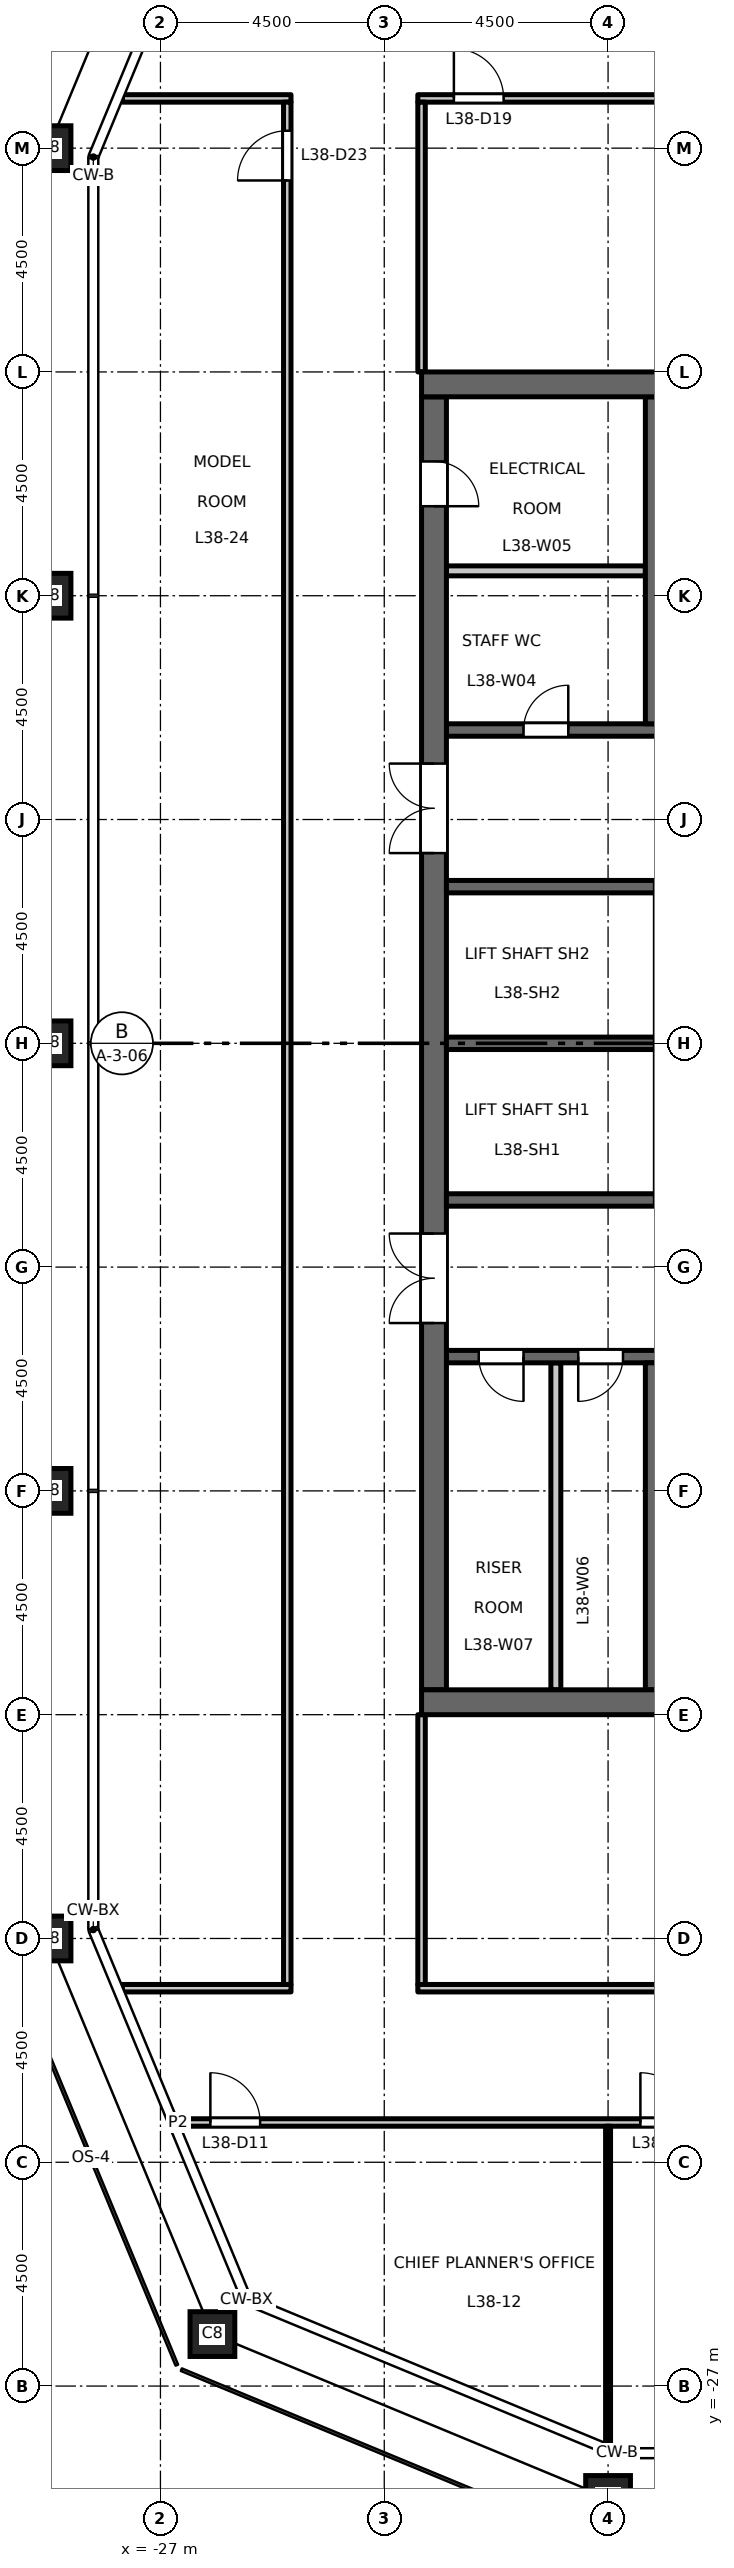
"""IFC4 building model, lengths in metres.
Left out: names, types, materials, properties, quantities, classifications, styles, units other than length and angle.
Written with IfcOpenShell. Run it as: python <this file> out.ifc"""

import sys

from ifc_helpers import new_model, si_unit, direction, frame, frame_2d, origin, origin_2d, place, context, subcontext, project, spatial, rectangle, hollow_rectangle, extrude, element, fill, save


model = new_model("IFC4")
c1 = context("Model", 3, precision=1e-05, world=origin(), true_north=direction((0.0, 1.0)))
c2 = subcontext(c1, "Body", "Model", "MODEL_VIEW")
j1 = project(units=[si_unit("LENGTHUNIT", "METRE"), si_unit("PLANEANGLEUNIT", "RADIAN")], contexts=[c1])
p1 = place(None, origin())
s1 = spatial("IfcSite", under=j1, at=p1, CompositionType="ELEMENT")
p2 = place(p1, origin())
s2 = spatial("IfcBuilding", under=s1, at=p2, CompositionType="ELEMENT")
p3 = place(p2, frame((0.0, 0.0, 176.7)))
s3 = spatial("IfcBuildingStorey", under=s2, at=p3, CompositionType="ELEMENT", Elevation=176.7)
for number, where, z_axis, x_axis in (
    (1, (-18.0, -29.25, 0.0), (0.0, 0.0, 1.0), (1.0, 0.0, 0.0)),
    (2, (-29.25, 18.0, 0.0), (0.0, 0.0, 1.0), (1.0, 0.0, 0.0)),
    (3, (-29.25, 9.0, 0.0), (0.0, 0.0, 1.0), (1.0, 0.0, 0.0)),
    (4, (-29.25, 0.0, 0.0), (0.0, 0.0, 1.0), (1.0, 0.0, 0.0)),
    (5, (-29.25, -9.0, 0.0), (0.0, 0.0, 1.0), (1.0, 0.0, 0.0)),
    (6, (-29.25, -18.0, 0.0), (0.0, 0.0, 1.0), (1.0, 0.0, 0.0)),
    (7, (-25.955, -25.955, 0.0), (0.0, 0.0, 1.0), (1.0, 0.0, 0.0)),
):
    element("IfcColumn", number, at=place(p3, frame(where, z_axis=z_axis, x_axis=x_axis)), inside=s3, PredefinedType="COLUMN", context=c2, shape_type="SweptSolid", body=[
        extrude(hollow_rectangle(XDim=0.9, YDim=0.9, WallThickness=0.05, at=origin_2d()), origin(), (0.0, 0.0, 1.0), 4.5),
    ])
p4 = place(p3, frame((-17.0, 6.3, 0.0), z_axis=(0.0, 0.0, 1.0), x_axis=(-1.0, 0.0, 0.0)))
e8 = element("IfcWall", 8, at=p4, inside=s3, PredefinedType="SHEAR", context=c2, shape_type="SweptSolid", body=[
    extrude(rectangle(XDim=4.25, YDim=0.25, at=frame_2d((2.125, 0.0))), origin(), (0.0, 0.0, 1.0), 4.3),
])
p5 = place(p4, frame((1.8, 0.0, 0.0)))
e9 = element("IfcOpeningElement", 9, at=p5, cuts=e8, PredefinedType="OPENING", context=c2, shape_type="SweptSolid", body=[
    extrude(rectangle(XDim=0.9, YDim=2.1, at=frame_2d((0.45, 1.05))), frame((0.0, 0.135, 0.0), z_axis=(0.0, -1.0, 0.0), x_axis=(1.0, 0.0, 0.0)), (0.0, 0.0, 1.0), 0.27),
])
p6 = place(p3, frame((-12.15, -6.3, 0.0), z_axis=(0.0, 0.0, 1.0), x_axis=(-1.0, 0.0, 0.0)))
e10 = element("IfcWall", 10, at=p6, inside=s3, PredefinedType="SHEAR", context=c2, shape_type="SweptSolid", body=[
    extrude(rectangle(XDim=9.1, YDim=0.25, at=frame_2d((4.55, 0.0))), origin(), (0.0, 0.0, 1.0), 4.3),
])
p7 = place(p6, frame((1.8, 0.0, 0.0)))
e11 = element("IfcOpeningElement", 11, at=p7, cuts=e10, PredefinedType="OPENING", context=c2, shape_type="SweptSolid", body=[
    extrude(rectangle(XDim=1.0, YDim=2.1, at=frame_2d((0.5, 1.05))), frame((0.0, 0.135, 0.0), z_axis=(0.0, -1.0, 0.0), x_axis=(1.0, 0.0, 0.0)), (0.0, 0.0, 1.0), 0.27),
])
p8 = place(p6, frame((5.55, 0.0, 0.0)))
e12 = element("IfcOpeningElement", 12, at=p8, cuts=e10, PredefinedType="OPENING", context=c2, shape_type="SweptSolid", body=[
    extrude(rectangle(XDim=0.9, YDim=2.1, at=frame_2d((0.45, 1.05))), frame((0.0, 0.135, 0.0), z_axis=(0.0, -1.0, 0.0), x_axis=(1.0, 0.0, 0.0)), (0.0, 0.0, 1.0), 0.27),
])
p9 = place(p6, frame((7.55, 0.0, 0.0)))
e13 = element("IfcOpeningElement", 13, at=p9, cuts=e10, PredefinedType="OPENING", context=c2, shape_type="SweptSolid", body=[
    extrude(rectangle(XDim=0.9, YDim=2.1, at=frame_2d((0.45, 1.05))), frame((0.0, 0.135, 0.0), z_axis=(0.0, -1.0, 0.0), x_axis=(1.0, 0.0, 0.0)), (0.0, 0.0, 1.0), 0.27),
])
p10 = place(p3, frame((-21.5, -13.0, 0.0), z_axis=(0.0, 0.0, 1.0), x_axis=(0.0, 1.0, 0.0)))
e14 = element("IfcWall", 14, at=p10, inside=s3, PredefinedType="SHEAR", context=c2, shape_type="SweptSolid", body=[
    extrude(rectangle(XDim=26.0, YDim=0.5, at=frame_2d((13.0, 0.0))), origin(), (0.0, 0.0, 1.0), 4.3),
])
p11 = place(p10, frame((16.825, 0.0, 0.0)))
e15 = element("IfcOpeningElement", 15, at=p11, cuts=e14, PredefinedType="OPENING", context=c2, shape_type="SweptSolid", body=[
    extrude(rectangle(XDim=1.8, YDim=2.1, at=frame_2d((0.9, 1.05))), frame((0.0, 0.26, 0.0), z_axis=(0.0, -1.0, 0.0), x_axis=(1.0, 0.0, 0.0)), (0.0, 0.0, 1.0), 0.52),
])
p12 = place(p10, frame((7.375, 0.0, 0.0)))
e16 = element("IfcOpeningElement", 16, at=p12, cuts=e14, PredefinedType="OPENING", context=c2, shape_type="SweptSolid", body=[
    extrude(rectangle(XDim=1.8, YDim=2.1, at=frame_2d((0.9, 1.05))), frame((0.0, 0.26, 0.0), z_axis=(0.0, -1.0, 0.0), x_axis=(1.0, 0.0, 0.0)), (0.0, 0.0, 1.0), 0.52),
])
p13 = place(p10, frame((23.8, 0.0, 0.0)))
e17 = element("IfcOpeningElement", 17, at=p13, cuts=e14, PredefinedType="OPENING", context=c2, shape_type="SweptSolid", body=[
    extrude(rectangle(XDim=0.9, YDim=2.1, at=frame_2d((0.45, 1.05))), frame((0.0, 0.26, 0.0), z_axis=(0.0, -1.0, 0.0), x_axis=(1.0, 0.0, 0.0)), (0.0, 0.0, 1.0), 0.52),
])
p14 = place(p3, frame((-17.25, 9.5, 0.0), z_axis=(0.0, 0.0, 1.0), x_axis=(-1.0, 0.0, 0.0)))
e18 = element("IfcWall", 18, at=p14, inside=s3, PredefinedType="PARTITIONING", context=c2, shape_type="SweptSolid", body=[
    extrude(rectangle(XDim=4.0, YDim=0.2, at=frame_2d((2.0, 0.0))), origin(), (0.0, 0.0, 1.0), 4.3),
])
p15 = place(p3, frame((-19.05, -13.0, 0.0), z_axis=(0.0, 0.0, 1.0), x_axis=(0.0, 1.0, 0.0)))
e19 = element("IfcWall", 19, at=p15, inside=s3, PredefinedType="PARTITIONING", context=c2, shape_type="SweptSolid", body=[
    extrude(rectangle(XDim=6.575, YDim=0.2, at=frame_2d((3.288, 0.0))), origin(), (0.0, 0.0, 1.0), 4.3),
])
for number, where, z_axis, x_axis in (
    (20, (-17.05, 0.0, 0.0), (0.0, 0.0, 1.0), (-1.0, 0.0, 0.0)),
    (21, (-17.05, 3.15, 0.0), (0.0, 0.0, 1.0), (-1.0, 0.0, 0.0)),
    (22, (-17.05, -3.15, 0.0), (0.0, 0.0, 1.0), (-1.0, 0.0, 0.0)),
):
    element("IfcWall", number, at=place(p3, frame(where, z_axis=z_axis, x_axis=x_axis)), inside=s3, PredefinedType="SHEAR", context=c2, shape_type="SweptSolid", body=[
        extrude(rectangle(XDim=4.2, YDim=0.25, at=frame_2d((2.1, 0.0))), origin(), (0.0, 0.0, 1.0), 4.3),
    ])
for number, where, z_axis, x_axis in (
    (23, (-17.0, 6.425, 0.0), (0.0, 0.0, 1.0), (0.0, 1.0, 0.0)),
    (24, (-17.0, -13.0, 0.0), (0.0, 0.0, 1.0), (0.0, 1.0, 0.0)),
):
    element("IfcWall", number, at=place(p3, frame(where, z_axis=z_axis, x_axis=x_axis)), inside=s3, PredefinedType="SHEAR", context=c2, shape_type="SweptSolid", body=[
        extrude(rectangle(XDim=6.575, YDim=0.5, at=frame_2d((3.288, 0.0))), origin(), (0.0, 0.0, 1.0), 4.3),
    ])
for number, where, z_axis, x_axis in (
    (25, (-8.25, 13.25, 0.0), (0.0, 0.0, 1.0), (-1.0, 0.0, 0.0)),
    (26, (-8.25, -13.25, 0.0), (0.0, 0.0, 1.0), (-1.0, 0.0, 0.0)),
):
    element("IfcWall", number, at=place(p3, frame(where, z_axis=z_axis, x_axis=x_axis)), inside=s3, PredefinedType="SHEAR", context=c2, shape_type="SweptSolid", body=[
        extrude(rectangle(XDim=13.5, YDim=0.5, at=frame_2d((6.75, 0.0))), origin(), (0.0, 0.0, 1.0), 4.3),
    ])
p16 = place(p3, frame((-26.646, -21.7, 0.0), z_axis=(0.0, 0.0, 1.0), x_axis=(1.0, 0.0, 0.0)))
e27 = element("IfcWall", 27, at=p16, inside=s3, PredefinedType="PARTITIONING", context=c2, shape_type="SweptSolid", body=[
    extrude(rectangle(XDim=53.292, YDim=0.15, at=frame_2d((26.646, 0.0))), origin(), (0.0, 0.0, 1.0), 4.3),
])
p17 = place(p16, frame((9.296, 0.0, 0.0)))
e28 = element("IfcOpeningElement", 28, at=p17, cuts=e27, PredefinedType="OPENING", context=c2, shape_type="SweptSolid", body=[
    extrude(rectangle(XDim=1.0, YDim=2.1, at=frame_2d((0.5, 1.05))), frame((0.0, 0.085, 0.0), z_axis=(0.0, -1.0, 0.0), x_axis=(1.0, 0.0, 0.0)), (0.0, 0.0, 1.0), 0.17),
])
p18 = place(p16, frame((25.046, 0.0, 0.0)))
e29 = element("IfcOpeningElement", 29, at=p18, cuts=e27, PredefinedType="OPENING", context=c2, shape_type="SweptSolid", body=[
    extrude(rectangle(XDim=1.0, YDim=2.1, at=frame_2d((0.5, 1.05))), frame((0.0, 0.085, 0.0), z_axis=(0.0, -1.0, 0.0), x_axis=(1.0, 0.0, 0.0)), (0.0, 0.0, 1.0), 0.17),
])
p19 = place(p16, frame((27.296, 0.0, 0.0)))
e30 = element("IfcOpeningElement", 30, at=p19, cuts=e27, PredefinedType="OPENING", context=c2, shape_type="SweptSolid", body=[
    extrude(rectangle(XDim=1.0, YDim=2.1, at=frame_2d((0.5, 1.05))), frame((0.0, 0.085, 0.0), z_axis=(0.0, -1.0, 0.0), x_axis=(1.0, 0.0, 0.0)), (0.0, 0.0, 1.0), 0.17),
])
p20 = place(p16, frame((43.046, 0.0, 0.0)))
e31 = element("IfcOpeningElement", 31, at=p20, cuts=e27, PredefinedType="OPENING", context=c2, shape_type="SweptSolid", body=[
    extrude(rectangle(XDim=1.0, YDim=2.1, at=frame_2d((0.5, 1.05))), frame((0.0, 0.085, 0.0), z_axis=(0.0, -1.0, 0.0), x_axis=(1.0, 0.0, 0.0)), (0.0, 0.0, 1.0), 0.17),
])
p21 = place(p16, frame((0.65, 0.0, 0.0)))
e32 = element("IfcOpeningElement", 32, at=p21, cuts=e27, PredefinedType="OPENING", context=c2, shape_type="SweptSolid", body=[
    extrude(rectangle(XDim=1.0, YDim=2.1, at=frame_2d((0.5, 1.05))), frame((0.0, 0.085, 0.0), z_axis=(0.0, -1.0, 0.0), x_axis=(1.0, 0.0, 0.0)), (0.0, 0.0, 1.0), 0.17),
])
p22 = place(p16, frame((51.546, 0.0, 0.0)))
e33 = element("IfcOpeningElement", 33, at=p22, cuts=e27, PredefinedType="OPENING", context=c2, shape_type="SweptSolid", body=[
    extrude(rectangle(XDim=1.0, YDim=2.1, at=frame_2d((0.5, 1.05))), frame((0.0, 0.085, 0.0), z_axis=(0.0, -1.0, 0.0), x_axis=(1.0, 0.0, 0.0)), (0.0, 0.0, 1.0), 0.17),
])
p23 = place(p3, frame((-27.764, -19.0, 0.0), z_axis=(0.0, 0.0, 1.0), x_axis=(1.0, 0.0, 0.0)))
e34 = element("IfcWall", 34, at=p23, inside=s3, PredefinedType="PARTITIONING", context=c2, shape_type="SweptSolid", body=[
    extrude(rectangle(XDim=3.389, YDim=0.15, at=frame_2d((1.694, 0.0))), origin(), (0.0, 0.0, 1.0), 4.3),
])
p24 = place(p3, frame((-21.825, -19.0, 0.0), z_axis=(0.0, 0.0, 1.0), x_axis=(1.0, 0.0, 0.0)))
e35 = element("IfcWall", 35, at=p24, inside=s3, PredefinedType="PARTITIONING", context=c2, shape_type="SweptSolid", body=[
    extrude(rectangle(XDim=43.65, YDim=0.15, at=frame_2d((21.825, 0.0))), origin(), (0.0, 0.0, 1.0), 4.3),
])
p25 = place(p24, frame((14.175, 0.0, 0.0)))
e36 = element("IfcOpeningElement", 36, at=p25, cuts=e35, PredefinedType="OPENING", context=c2, shape_type="SweptSolid", body=[
    extrude(rectangle(XDim=1.0, YDim=2.1, at=frame_2d((0.5, 1.05))), frame((0.0, 0.085, 0.0), z_axis=(0.0, -1.0, 0.0), x_axis=(1.0, 0.0, 0.0)), (0.0, 0.0, 1.0), 0.17),
])
p26 = place(p24, frame((11.925, 0.0, 0.0)))
e37 = element("IfcOpeningElement", 37, at=p26, cuts=e35, PredefinedType="OPENING", context=c2, shape_type="SweptSolid", body=[
    extrude(rectangle(XDim=1.0, YDim=2.1, at=frame_2d((0.5, 1.05))), frame((0.0, 0.085, 0.0), z_axis=(0.0, -1.0, 0.0), x_axis=(1.0, 0.0, 0.0)), (0.0, 0.0, 1.0), 0.17),
])
p27 = place(p24, frame((30.675, 0.0, 0.0)))
e38 = element("IfcOpeningElement", 38, at=p27, cuts=e35, PredefinedType="OPENING", context=c2, shape_type="SweptSolid", body=[
    extrude(rectangle(XDim=1.0, YDim=2.1, at=frame_2d((0.5, 1.05))), frame((0.0, 0.085, 0.0), z_axis=(0.0, -1.0, 0.0), x_axis=(1.0, 0.0, 0.0)), (0.0, 0.0, 1.0), 0.17),
])
p28 = place(p3, frame((-27.764, 19.0, 0.0), z_axis=(0.0, 0.0, 1.0), x_axis=(1.0, 0.0, 0.0)))
e39 = element("IfcWall", 39, at=p28, inside=s3, PredefinedType="PARTITIONING", context=c2, shape_type="SweptSolid", body=[
    extrude(rectangle(XDim=3.389, YDim=0.15, at=frame_2d((1.694, 0.0))), origin(), (0.0, 0.0, 1.0), 4.3),
])
p29 = place(p3, frame((-21.825, 19.0, 0.0), z_axis=(0.0, 0.0, 1.0), x_axis=(1.0, 0.0, 0.0)))
e40 = element("IfcWall", 40, at=p29, inside=s3, PredefinedType="PARTITIONING", context=c2, shape_type="SweptSolid", body=[
    extrude(rectangle(XDim=43.65, YDim=0.15, at=frame_2d((21.825, 0.0))), origin(), (0.0, 0.0, 1.0), 4.3),
])
p30 = place(p29, frame((14.225, 0.0, 0.0)))
e41 = element("IfcOpeningElement", 41, at=p30, cuts=e40, PredefinedType="OPENING", context=c2, shape_type="SweptSolid", body=[
    extrude(rectangle(XDim=1.0, YDim=2.1, at=frame_2d((0.5, 1.05))), frame((0.0, 0.085, 0.0), z_axis=(0.0, -1.0, 0.0), x_axis=(1.0, 0.0, 0.0)), (0.0, 0.0, 1.0), 0.17),
])
p31 = place(p29, frame((0.725, 0.0, 0.0)))
e42 = element("IfcOpeningElement", 42, at=p31, cuts=e40, PredefinedType="OPENING", context=c2, shape_type="SweptSolid", body=[
    extrude(rectangle(XDim=1.0, YDim=2.1, at=frame_2d((0.5, 1.05))), frame((0.0, 0.085, 0.0), z_axis=(0.0, -1.0, 0.0), x_axis=(1.0, 0.0, 0.0)), (0.0, 0.0, 1.0), 0.17),
])
p32 = place(p29, frame((41.975, 0.0, 0.0)))
e43 = element("IfcOpeningElement", 43, at=p32, cuts=e40, PredefinedType="OPENING", context=c2, shape_type="SweptSolid", body=[
    extrude(rectangle(XDim=1.0, YDim=2.1, at=frame_2d((0.5, 1.05))), frame((0.0, 0.085, 0.0), z_axis=(0.0, -1.0, 0.0), x_axis=(1.0, 0.0, 0.0)), (0.0, 0.0, 1.0), 0.17),
])
p33 = place(p3, frame((-24.45, -18.925, 0.0), z_axis=(0.0, 0.0, 1.0), x_axis=(0.0, 1.0, 0.0)))
e44 = element("IfcWall", 44, at=p33, inside=s3, PredefinedType="PARTITIONING", context=c2, shape_type="SweptSolid", body=[
    extrude(rectangle(XDim=37.85, YDim=0.15, at=frame_2d((18.925, 0.0))), origin(), (0.0, 0.0, 1.0), 4.3),
])
p34 = place(p33, frame((36.275, 0.0, 0.0)))
e45 = element("IfcOpeningElement", 45, at=p34, cuts=e44, PredefinedType="OPENING", context=c2, shape_type="SweptSolid", body=[
    extrude(rectangle(XDim=1.0, YDim=2.1, at=frame_2d((0.5, 1.05))), frame((0.0, 0.085, 0.0), z_axis=(0.0, -1.0, 0.0), x_axis=(1.0, 0.0, 0.0)), (0.0, 0.0, 1.0), 0.17),
])
for number, where, z_axis, x_axis in (
    (46, (-21.75, -18.925, 0.0), (0.0, 0.0, 1.0), (0.0, 1.0, 0.0)),
    (47, (-21.75, 13.5, 0.0), (0.0, 0.0, 1.0), (0.0, 1.0, 0.0)),
):
    element("IfcWall", number, at=place(p3, frame(where, z_axis=z_axis, x_axis=x_axis)), inside=s3, PredefinedType="PARTITIONING", context=c2, shape_type="SweptSolid", body=[
        extrude(rectangle(XDim=5.425, YDim=0.15, at=frame_2d((2.712, 0.0))), origin(), (0.0, 0.0, 1.0), 4.3),
    ])
p35 = place(p3, frame((-18.0, -28.178, 0.0), z_axis=(0.0, 0.0, 1.0), x_axis=(0.0, 1.0, 0.0)))
e48 = element("IfcWall", 48, at=p35, inside=s3, PredefinedType="PARTITIONING", context=c2, shape_type="SweptSolid", body=[
    extrude(rectangle(XDim=6.403, YDim=0.1, at=frame_2d((3.202, 0.0))), origin(), (0.0, 0.0, 1.0), 3.4),
])
p36 = place(p11, origin())
e49 = element("IfcDoor", 49, at=p36, inside=s3, OperationType="DOUBLE_DOOR_DOUBLE_SWING", PredefinedType="DOOR", context=c2, shape_type="SweptSolid", body=[
    extrude(rectangle(XDim=1.8, YDim=2.1, at=frame_2d((0.9, 1.05))), frame((0.0, 0.025, 0.0), z_axis=(0.0, -1.0, 0.0), x_axis=(1.0, 0.0, 0.0)), (0.0, 0.0, 1.0), 0.05),
])
fill(e15, e49)
p37 = place(p12, origin())
e50 = element("IfcDoor", 50, at=p37, inside=s3, OperationType="DOUBLE_DOOR_DOUBLE_SWING", PredefinedType="DOOR", context=c2, shape_type="SweptSolid", body=[
    extrude(rectangle(XDim=1.8, YDim=2.1, at=frame_2d((0.9, 1.05))), frame((0.0, 0.025, 0.0), z_axis=(0.0, -1.0, 0.0), x_axis=(1.0, 0.0, 0.0)), (0.0, 0.0, 1.0), 0.05),
])
fill(e16, e50)
p38 = place(p5, origin())
e51 = element("IfcDoor", 51, at=p38, inside=s3, OperationType="SINGLE_SWING_LEFT", PredefinedType="DOOR", context=c2, shape_type="SweptSolid", body=[
    extrude(rectangle(XDim=0.9, YDim=2.1, at=frame_2d((0.45, 1.05))), frame((0.0, 0.025, 0.0), z_axis=(0.0, -1.0, 0.0), x_axis=(1.0, 0.0, 0.0)), (0.0, 0.0, 1.0), 0.05),
])
fill(e9, e51)
p39 = place(p13, origin())
e52 = element("IfcDoor", 52, at=p39, inside=s3, OperationType="SINGLE_SWING_LEFT", PredefinedType="DOOR", context=c2, shape_type="SweptSolid", body=[
    extrude(rectangle(XDim=0.9, YDim=2.1, at=frame_2d((0.45, 1.05))), frame((0.0, 0.025, 0.0), z_axis=(0.0, -1.0, 0.0), x_axis=(1.0, 0.0, 0.0)), (0.0, 0.0, 1.0), 0.05),
])
fill(e17, e52)
p40 = place(p8, origin())
e53 = element("IfcDoor", 53, at=p40, inside=s3, OperationType="SINGLE_SWING_LEFT", PredefinedType="DOOR", context=c2, shape_type="SweptSolid", body=[
    extrude(rectangle(XDim=0.9, YDim=2.1, at=frame_2d((0.45, 1.05))), frame((0.0, 0.025, 0.0), z_axis=(0.0, -1.0, 0.0), x_axis=(1.0, 0.0, 0.0)), (0.0, 0.0, 1.0), 0.05),
])
fill(e12, e53)
p41 = place(p9, origin())
e54 = element("IfcDoor", 54, at=p41, inside=s3, OperationType="SINGLE_SWING_RIGHT", PredefinedType="DOOR", context=c2, shape_type="SweptSolid", body=[
    extrude(rectangle(XDim=0.9, YDim=2.1, at=frame_2d((0.45, 1.05))), frame((0.0, 0.025, 0.0), z_axis=(0.0, -1.0, 0.0), x_axis=(1.0, 0.0, 0.0)), (0.0, 0.0, 1.0), 0.05),
])
fill(e13, e54)
p42 = place(p17, origin())
e55 = element("IfcDoor", 55, at=p42, inside=s3, OperationType="SINGLE_SWING_LEFT", PredefinedType="DOOR", context=c2, shape_type="SweptSolid", body=[
    extrude(rectangle(XDim=1.0, YDim=2.1, at=frame_2d((0.5, 1.05))), frame((0.0, 0.025, 0.0), z_axis=(0.0, -1.0, 0.0), x_axis=(1.0, 0.0, 0.0)), (0.0, 0.0, 1.0), 0.05),
])
fill(e28, e55)
p43 = place(p21, origin())
e56 = element("IfcDoor", 56, at=p43, inside=s3, OperationType="SINGLE_SWING_LEFT", PredefinedType="DOOR", context=c2, shape_type="SweptSolid", body=[
    extrude(rectangle(XDim=1.0, YDim=2.1, at=frame_2d((0.5, 1.05))), frame((0.0, 0.025, 0.0), z_axis=(0.0, -1.0, 0.0), x_axis=(1.0, 0.0, 0.0)), (0.0, 0.0, 1.0), 0.05),
])
fill(e32, e56)
p44 = place(p31, origin())
e57 = element("IfcDoor", 57, at=p44, inside=s3, OperationType="SINGLE_SWING_LEFT", PredefinedType="DOOR", context=c2, shape_type="SweptSolid", body=[
    extrude(rectangle(XDim=1.0, YDim=2.1, at=frame_2d((0.5, 1.05))), frame((0.0, 0.025, 0.0), z_axis=(0.0, -1.0, 0.0), x_axis=(1.0, 0.0, 0.0)), (0.0, 0.0, 1.0), 0.05),
])
fill(e42, e57)
p45 = place(p34, origin())
e58 = element("IfcDoor", 58, at=p45, inside=s3, OperationType="SINGLE_SWING_LEFT", PredefinedType="DOOR", context=c2, shape_type="SweptSolid", body=[
    extrude(rectangle(XDim=1.0, YDim=2.1, at=frame_2d((0.5, 1.05))), frame((0.0, 0.025, 0.0), z_axis=(0.0, -1.0, 0.0), x_axis=(1.0, 0.0, 0.0)), (0.0, 0.0, 1.0), 0.05),
])
fill(e45, e58)
save(model, sys.argv[1])
